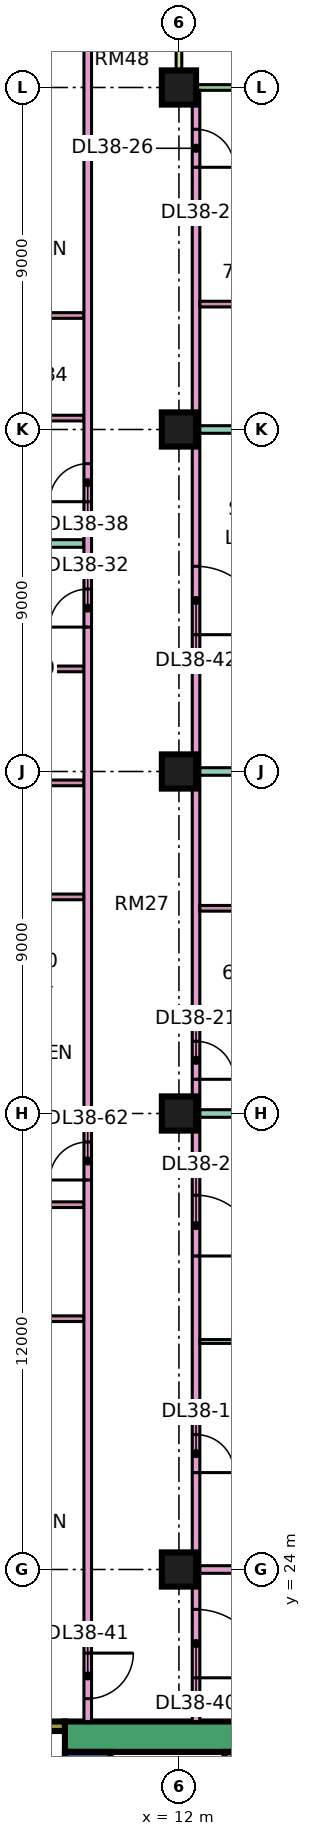
"""IFC4 building model, lengths in metres.
Left out: names, types, materials, properties, quantities, classifications, styles, units other than length and angle.
Written with IfcOpenShell. Run it as: python <this file> out.ifc"""

import sys

from ifc_helpers import new_model, si_unit, direction, frame, frame_2d, origin, origin_2d, place, context, subcontext, project, spatial, rectangle, extrude, element, fill, save


model = new_model("IFC4")
c1 = context("Model", 3, precision=1e-05, world=origin(), true_north=direction((0.0, 1.0)))
c2 = subcontext(c1, "Body", "Model", "MODEL_VIEW")
j1 = project(units=[si_unit("LENGTHUNIT", "METRE"), si_unit("PLANEANGLEUNIT", "RADIAN")], contexts=[c1])
p1 = place(None, origin())
s1 = spatial("IfcSite", under=j1, at=p1, CompositionType="ELEMENT")
p2 = place(p1, origin())
s2 = spatial("IfcBuilding", under=s1, at=p2, CompositionType="ELEMENT")
p3 = place(p2, frame((0.0, 0.0, 168.65)))
s3 = spatial("IfcBuildingStorey", under=s2, at=p3, CompositionType="ELEMENT", Elevation=168.65)
for number, where, z_axis, x_axis in (
    (1, (12.0, 24.0, 0.0), (0.0, 0.0, 1.0), (1.0, 0.0, 0.0)),
    (2, (12.0, 36.0, 0.0), (0.0, 0.0, 1.0), (1.0, 0.0, 0.0)),
    (3, (12.0, 45.0, 0.0), (0.0, 0.0, 1.0), (1.0, 0.0, 0.0)),
    (4, (12.0, 54.0, 0.0), (0.0, 0.0, 1.0), (1.0, 0.0, 0.0)),
    (5, (12.0, 63.0, 0.0), (0.0, 0.0, 1.0), (1.0, 0.0, 0.0)),
):
    element("IfcColumn", number, at=place(p3, frame(where, z_axis=z_axis, x_axis=x_axis)), inside=s3, PredefinedType="COLUMN", context=c2, shape_type="SweptSolid", body=[
        extrude(rectangle(XDim=0.9, YDim=0.9, at=origin_2d()), origin(), (0.0, 0.0, 1.0), 3.75),
    ])
p4 = place(p3, frame((9.0, 19.6, 0.0), z_axis=(0.0, 0.0, 1.0), x_axis=(1.0, 0.0, 0.0)))
e6 = element("IfcWall", 6, at=p4, inside=s3, PredefinedType="SHEAR", context=c2, shape_type="SweptSolid", body=[
    extrude(rectangle(XDim=25.0, YDim=0.8, at=frame_2d((12.5, 0.0))), origin(), (0.0, 0.0, 1.0), 3.75),
])
p5 = place(p4, frame((19.1, 0.0, 0.0)))
e7 = element("IfcOpeningElement", 7, at=p5, cuts=e6, PredefinedType="OPENING", context=c2, shape_type="SweptSolid", body=[
    extrude(rectangle(XDim=1.8, YDim=2.4, at=frame_2d((0.9, 1.2))), frame((0.0, 0.41, 0.0), z_axis=(0.0, -1.0, 0.0), x_axis=(1.0, 0.0, 0.0)), (0.0, 0.0, 1.0), 0.82),
])
p6 = place(p3, frame((9.6, 7.8, 0.0), z_axis=(0.0, 0.0, 1.0), x_axis=(0.0, 1.0, 0.0)))
e8 = element("IfcWall", 8, at=p6, inside=s3, PredefinedType="SHEAR", context=c2, shape_type="SweptSolid", body=[
    extrude(rectangle(XDim=11.4, YDim=1.2, at=frame_2d((5.7, 0.0))), origin(), (0.0, 0.0, 1.0), 3.75),
])
p7 = place(p6, frame((4.075, 0.0, 0.0)))
e9 = element("IfcOpeningElement", 9, at=p7, cuts=e8, PredefinedType="OPENING", context=c2, shape_type="SweptSolid", body=[
    extrude(rectangle(XDim=1.1, YDim=2.2, at=frame_2d((0.55, 1.1))), frame((0.0, 0.61, 0.0), z_axis=(0.0, -1.0, 0.0), x_axis=(1.0, 0.0, 0.0)), (0.0, 0.0, 1.0), 1.22),
])
p8 = place(p6, frame((6.575, 0.0, 0.0)))
e10 = element("IfcOpeningElement", 10, at=p8, cuts=e8, PredefinedType="OPENING", context=c2, shape_type="SweptSolid", body=[
    extrude(rectangle(XDim=1.1, YDim=2.2, at=frame_2d((0.55, 1.1))), frame((0.0, 0.61, 0.0), z_axis=(0.0, -1.0, 0.0), x_axis=(1.0, 0.0, 0.0)), (0.0, 0.0, 1.0), 1.22),
])
p9 = place(p6, frame((9.4, 0.0, 0.0)))
e11 = element("IfcOpeningElement", 11, at=p9, cuts=e8, PredefinedType="OPENING", context=c2, shape_type="SweptSolid", body=[
    extrude(rectangle(XDim=1.1, YDim=2.2, at=frame_2d((0.55, 1.1))), frame((0.0, 0.61, 0.0), z_axis=(0.0, -1.0, 0.0), x_axis=(1.0, 0.0, 0.0)), (0.0, 0.0, 1.0), 1.22),
])
p10 = place(p6, frame((1.75, 0.0, 0.0)))
e12 = element("IfcOpeningElement", 12, at=p10, cuts=e8, PredefinedType="OPENING", context=c2, shape_type="SweptSolid", body=[
    extrude(rectangle(XDim=0.9, YDim=2.1, at=frame_2d((0.45, 1.05))), frame((0.0, 0.61, 0.0), z_axis=(0.0, -1.0, 0.0), x_axis=(1.0, 0.0, 0.0)), (0.0, 0.0, 1.0), 1.22),
])
p11 = place(p3, frame((13.325, 7.8, 0.0), z_axis=(0.0, 0.0, 1.0), x_axis=(0.0, 1.0, 0.0)))
e13 = element("IfcWall", 13, at=p11, inside=s3, PredefinedType="SHEAR", context=c2, shape_type="SweptSolid", body=[
    extrude(rectangle(XDim=11.4, YDim=0.25, at=frame_2d((5.7, 0.0))), origin(), (0.0, 0.0, 1.0), 3.75),
])
p12 = place(p3, frame((2.1, 19.875, 0.0), z_axis=(0.0, 0.0, 1.0), x_axis=(1.0, 0.0, 0.0)))
e14 = element("IfcWall", 14, at=p12, inside=s3, PredefinedType="SHEAR", context=c2, shape_type="SweptSolid", body=[
    extrude(rectangle(XDim=6.9, YDim=0.25, at=frame_2d((3.45, 0.0))), origin(), (0.0, 0.0, 1.0), 3.75),
])
p13 = place(p12, frame((1.175, 0.0, 0.0)))
e15 = element("IfcOpeningElement", 15, at=p13, cuts=e14, PredefinedType="OPENING", context=c2, shape_type="SweptSolid", body=[
    extrude(rectangle(XDim=1.1, YDim=2.2, at=frame_2d((0.55, 1.1))), frame((0.0, 0.135, 0.0), z_axis=(0.0, -1.0, 0.0), x_axis=(1.0, 0.0, 0.0)), (0.0, 0.0, 1.0), 0.27),
])
p14 = place(p12, frame((4.6, 0.0, 0.0)))
e16 = element("IfcOpeningElement", 16, at=p14, cuts=e14, PredefinedType="OPENING", context=c2, shape_type="SweptSolid", body=[
    extrude(rectangle(XDim=1.2, YDim=2.2, at=frame_2d((0.6, 1.1))), frame((0.0, 0.135, 0.0), z_axis=(0.0, -1.0, 0.0), x_axis=(1.0, 0.0, 0.0)), (0.0, 0.0, 1.0), 0.27),
])
p15 = place(p3, frame((22.425, 63.0, 0.0), z_axis=(0.0, 0.0, 1.0), x_axis=(-1.0, 0.0, 0.0)))
e17 = element("IfcWall", 17, at=p15, inside=s3, PredefinedType="SOLIDWALL", context=c2, shape_type="SweptSolid", body=[
    extrude(rectangle(XDim=10.35, YDim=0.15, at=frame_2d((5.175, 0.0))), origin(), (0.0, 0.0, 1.0), 3.35),
])
p16 = place(p15, frame((1.087, 0.0, 0.0)))
e18 = element("IfcOpeningElement", 18, at=p16, cuts=e17, PredefinedType="OPENING", context=c2, shape_type="SweptSolid", body=[
    extrude(rectangle(XDim=1.8, YDim=2.4, at=frame_2d((0.9, 1.2))), frame((0.0, 0.085, 0.0), z_axis=(0.0, -1.0, 0.0), x_axis=(1.0, 0.0, 0.0)), (0.0, 0.0, 1.0), 0.17),
])
p17 = place(p15, frame((5.425, 0.0, 0.45)))
e19 = element("IfcOpeningElement", 19, at=p17, cuts=e17, PredefinedType="OPENING", context=c2, shape_type="SweptSolid", body=[
    extrude(rectangle(XDim=3.0, YDim=2.4, at=frame_2d((1.5, 1.2))), frame((0.0, 0.085, 0.0), z_axis=(0.0, -1.0, 0.0), x_axis=(1.0, 0.0, 0.0)), (0.0, 0.0, 1.0), 0.17),
])
p18 = place(p3, frame((12.0, 64.5, 0.0), z_axis=(0.0, 0.0, 1.0), x_axis=(0.0, -1.0, 0.0)))
e20 = element("IfcWall", 20, at=p18, inside=s3, PredefinedType="SOLIDWALL", context=c2, shape_type="SweptSolid", body=[
    extrude(rectangle(XDim=1.5, YDim=0.15, at=frame_2d((0.75, 0.0))), origin(), (0.0, 0.0, 1.0), 3.35),
])
p19 = place(p3, frame((0.0, 36.0, 0.0), z_axis=(0.0, 0.0, 1.0), x_axis=(1.0, 0.0, 0.0)))
e21 = element("IfcWall", 21, at=p19, inside=s3, PredefinedType="PARTITIONING", context=c2, shape_type="SweptSolid", body=[
    extrude(rectangle(XDim=9.5, YDim=0.2, at=frame_2d((4.75, 0.0))), origin(), (0.0, 0.0, 1.0), 3.35),
])
p20 = place(p3, frame((-1.35, 51.0, 0.0), z_axis=(0.0, 0.0, 1.0), x_axis=(1.0, 0.0, 0.0)))
e22 = element("IfcWall", 22, at=p20, inside=s3, PredefinedType="PARTITIONING", context=c2, shape_type="SweptSolid", body=[
    extrude(rectangle(XDim=10.85, YDim=0.2, at=frame_2d((5.425, 0.0))), origin(), (0.0, 0.0, 1.0), 3.35),
])
p21 = place(p3, frame((0.074, 22.4, 0.0), z_axis=(0.0, 0.0, 1.0), x_axis=(1.0, 0.0, 0.0)))
e23 = element("IfcWall", 23, at=p21, inside=s3, PredefinedType="PARTITIONING", context=c2, shape_type="SweptSolid", body=[
    extrude(rectangle(XDim=9.426, YDim=0.2, at=frame_2d((4.713, 0.0))), origin(), (0.0, 0.0, 1.0), 3.35),
])
for number, where, z_axis, x_axis in (
    (24, (6.375, 30.6, 0.0), (0.0, 0.0, 1.0), (1.0, 0.0, 0.0)),
    (25, (6.375, 33.6, 0.0), (0.0, 0.0, 1.0), (1.0, 0.0, 0.0)),
):
    element("IfcWall", number, at=place(p3, frame(where, z_axis=z_axis, x_axis=x_axis)), inside=s3, PredefinedType="PARTITIONING", context=c2, shape_type="SweptSolid", body=[
        extrude(rectangle(XDim=3.125, YDim=0.15, at=frame_2d((1.562, 0.0))), origin(), (0.0, 0.0, 1.0), 3.35),
    ])
p22 = place(p3, frame((6.375, 54.3, 0.0), z_axis=(0.0, 0.0, 1.0), x_axis=(1.0, 0.0, 0.0)))
e26 = element("IfcWall", 26, at=p22, inside=s3, PredefinedType="PARTITIONING", context=c2, shape_type="SweptSolid", body=[
    extrude(rectangle(XDim=3.125, YDim=0.15, at=frame_2d((1.562, 0.0))), origin(), (0.0, 0.0, 1.0), 3.35),
])
p23 = place(p22, frame((1.225, 0.0, 0.0)))
e27 = element("IfcOpeningElement", 27, at=p23, cuts=e26, PredefinedType="OPENING", context=c2, shape_type="SweptSolid", body=[
    extrude(rectangle(XDim=0.8, YDim=2.1, at=frame_2d((0.4, 1.05))), frame((0.0, 0.085, 0.0), z_axis=(0.0, -1.0, 0.0), x_axis=(1.0, 0.0, 0.0)), (0.0, 0.0, 1.0), 0.17),
])
p24 = place(p3, frame((6.375, 57.0, 0.0), z_axis=(0.0, 0.0, 1.0), x_axis=(1.0, 0.0, 0.0)))
e28 = element("IfcWall", 28, at=p24, inside=s3, PredefinedType="PARTITIONING", context=c2, shape_type="SweptSolid", body=[
    extrude(rectangle(XDim=3.125, YDim=0.15, at=frame_2d((1.562, 0.0))), origin(), (0.0, 0.0, 1.0), 3.35),
])
for number, where, z_axis, x_axis in (
    (29, (6.675, 41.7, 0.0), (0.0, 0.0, 1.0), (1.0, 0.0, 0.0)),
    (30, (6.675, 44.7, 0.0), (0.0, 0.0, 1.0), (1.0, 0.0, 0.0)),
    (31, (6.675, 47.7, 0.0), (0.0, 0.0, 1.0), (1.0, 0.0, 0.0)),
):
    element("IfcWall", number, at=place(p3, frame(where, z_axis=z_axis, x_axis=x_axis)), inside=s3, PredefinedType="PARTITIONING", context=c2, shape_type="SweptSolid", body=[
        extrude(rectangle(XDim=2.825, YDim=0.15, at=frame_2d((1.413, 0.0))), origin(), (0.0, 0.0, 1.0), 3.35),
    ])
p25 = place(p3, frame((9.6, 20.0, 0.0), z_axis=(0.0, 0.0, 1.0), x_axis=(0.0, 1.0, 0.0)))
e32 = element("IfcWall", 32, at=p25, inside=s3, PredefinedType="PARTITIONING", context=c2, shape_type="SweptSolid", body=[
    extrude(rectangle(XDim=44.35, YDim=0.2, at=frame_2d((22.175, 0.0))), origin(), (0.0, 0.0, 1.0), 3.35),
])
p26 = place(p25, frame((28.8, 0.0, 0.0)))
e33 = element("IfcOpeningElement", 33, at=p26, cuts=e32, PredefinedType="OPENING", context=c2, shape_type="SweptSolid", body=[
    extrude(rectangle(XDim=1.0, YDim=2.1, at=frame_2d((0.5, 1.05))), frame((0.0, 0.11, 0.0), z_axis=(0.0, -1.0, 0.0), x_axis=(1.0, 0.0, 0.0)), (0.0, 0.0, 1.0), 0.22),
])
p27 = place(p25, frame((32.1, 0.0, 0.0)))
e34 = element("IfcOpeningElement", 34, at=p27, cuts=e32, PredefinedType="OPENING", context=c2, shape_type="SweptSolid", body=[
    extrude(rectangle(XDim=1.0, YDim=2.1, at=frame_2d((0.5, 1.05))), frame((0.0, 0.11, 0.0), z_axis=(0.0, -1.0, 0.0), x_axis=(1.0, 0.0, 0.0)), (0.0, 0.0, 1.0), 0.22),
])
p28 = place(p25, frame((0.6, 0.0, 0.0)))
e35 = element("IfcOpeningElement", 35, at=p28, cuts=e32, PredefinedType="OPENING", context=c2, shape_type="SweptSolid", body=[
    extrude(rectangle(XDim=1.2, YDim=2.1, at=frame_2d((0.6, 1.05))), frame((0.0, 0.11, 0.0), z_axis=(0.0, -1.0, 0.0), x_axis=(1.0, 0.0, 0.0)), (0.0, 0.0, 1.0), 0.22),
])
p29 = place(p25, frame((14.25, 0.0, 0.0)))
e36 = element("IfcOpeningElement", 36, at=p29, cuts=e32, PredefinedType="OPENING", context=c2, shape_type="SweptSolid", body=[
    extrude(rectangle(XDim=1.0, YDim=2.1, at=frame_2d((0.5, 1.05))), frame((0.0, 0.11, 0.0), z_axis=(0.0, -1.0, 0.0), x_axis=(1.0, 0.0, 0.0)), (0.0, 0.0, 1.0), 0.22),
])
p30 = place(p3, frame((12.45, 20.0, 0.0), z_axis=(0.0, 0.0, 1.0), x_axis=(0.0, 1.0, 0.0)))
e37 = element("IfcWall", 37, at=p30, inside=s3, PredefinedType="PARTITIONING", context=c2, shape_type="SweptSolid", body=[
    extrude(rectangle(XDim=42.926, YDim=0.2, at=frame_2d((21.463, 0.0))), origin(), (0.0, 0.0, 1.0), 3.35),
])
p31 = place(p30, frame((6.55, 0.0, 0.0)))
e38 = element("IfcOpeningElement", 38, at=p31, cuts=e37, PredefinedType="OPENING", context=c2, shape_type="SweptSolid", body=[
    extrude(rectangle(XDim=1.0, YDim=2.1, at=frame_2d((0.5, 1.05))), frame((0.0, 0.11, 0.0), z_axis=(0.0, -1.0, 0.0), x_axis=(1.0, 0.0, 0.0)), (0.0, 0.0, 1.0), 0.22),
])
p32 = place(p30, frame((12.25, 0.0, 0.0)))
e39 = element("IfcOpeningElement", 39, at=p32, cuts=e37, PredefinedType="OPENING", context=c2, shape_type="SweptSolid", body=[
    extrude(rectangle(XDim=1.6, YDim=2.1, at=frame_2d((0.8, 1.05))), frame((0.0, 0.11, 0.0), z_axis=(0.0, -1.0, 0.0), x_axis=(1.0, 0.0, 0.0)), (0.0, 0.0, 1.0), 0.22),
])
p33 = place(p30, frame((16.9, 0.0, 0.0)))
e40 = element("IfcOpeningElement", 40, at=p33, cuts=e37, PredefinedType="OPENING", context=c2, shape_type="SweptSolid", body=[
    extrude(rectangle(XDim=1.0, YDim=2.1, at=frame_2d((0.5, 1.05))), frame((0.0, 0.11, 0.0), z_axis=(0.0, -1.0, 0.0), x_axis=(1.0, 0.0, 0.0)), (0.0, 0.0, 1.0), 0.22),
])
p34 = place(p30, frame((40.9, 0.0, 0.0)))
e41 = element("IfcOpeningElement", 41, at=p34, cuts=e37, PredefinedType="OPENING", context=c2, shape_type="SweptSolid", body=[
    extrude(rectangle(XDim=1.0, YDim=2.1, at=frame_2d((0.5, 1.05))), frame((0.0, 0.11, 0.0), z_axis=(0.0, -1.0, 0.0), x_axis=(1.0, 0.0, 0.0)), (0.0, 0.0, 1.0), 0.22),
])
p35 = place(p30, frame((1.15, 0.0, 0.0)))
e42 = element("IfcOpeningElement", 42, at=p35, cuts=e37, PredefinedType="OPENING", context=c2, shape_type="SweptSolid", body=[
    extrude(rectangle(XDim=1.8, YDim=2.1, at=frame_2d((0.9, 1.05))), frame((0.0, 0.11, 0.0), z_axis=(0.0, -1.0, 0.0), x_axis=(1.0, 0.0, 0.0)), (0.0, 0.0, 1.0), 0.22),
])
p36 = place(p30, frame((28.6, 0.0, 0.0)))
e43 = element("IfcOpeningElement", 43, at=p36, cuts=e37, PredefinedType="OPENING", context=c2, shape_type="SweptSolid", body=[
    extrude(rectangle(XDim=1.8, YDim=2.1, at=frame_2d((0.9, 1.05))), frame((0.0, 0.11, 0.0), z_axis=(0.0, -1.0, 0.0), x_axis=(1.0, 0.0, 0.0)), (0.0, 0.0, 1.0), 0.22),
])
p37 = place(p3, frame((12.55, 24.0, 0.0), z_axis=(0.0, 0.0, 1.0), x_axis=(1.0, 0.0, 0.0)))
e44 = element("IfcWall", 44, at=p37, inside=s3, PredefinedType="PARTITIONING", context=c2, shape_type="SweptSolid", body=[
    extrude(rectangle(XDim=8.95, YDim=0.2, at=frame_2d((4.475, 0.0))), origin(), (0.0, 0.0, 1.0), 3.35),
])
p38 = place(p3, frame((12.55, 30.0, 0.0), z_axis=(0.0, 0.0, 1.0), x_axis=(1.0, 0.0, 0.0)))
e45 = element("IfcWall", 45, at=p38, inside=s3, PredefinedType="PARTITIONING", context=c2, shape_type="SweptSolid", body=[
    extrude(rectangle(XDim=8.95, YDim=0.1, at=frame_2d((4.475, 0.0))), origin(), (0.0, 0.0, 1.0), 3.35),
])
p39 = place(p3, frame((12.55, 36.0, 0.0), z_axis=(0.0, 0.0, 1.0), x_axis=(1.0, 0.0, 0.0)))
e46 = element("IfcWall", 46, at=p39, inside=s3, PredefinedType="PARTITIONING", context=c2, shape_type="SweptSolid", body=[
    extrude(rectangle(XDim=11.45, YDim=0.2, at=frame_2d((5.725, 0.0))), origin(), (0.0, 0.0, 1.0), 3.35),
])
for number, where, z_axis, x_axis in (
    (47, (12.55, 38.7, 0.0), (0.0, 0.0, 1.0), (1.0, 0.0, 0.0)),
    (48, (12.55, 41.4, 0.0), (0.0, 0.0, 1.0), (1.0, 0.0, 0.0)),
):
    element("IfcWall", number, at=place(p3, frame(where, z_axis=z_axis, x_axis=x_axis)), inside=s3, PredefinedType="PARTITIONING", context=c2, shape_type="SweptSolid", body=[
        extrude(rectangle(XDim=4.625, YDim=0.15, at=frame_2d((2.312, 0.0))), origin(), (0.0, 0.0, 1.0), 3.35),
    ])
p40 = place(p3, frame((12.55, 45.0, 0.0), z_axis=(0.0, 0.0, 1.0), x_axis=(1.0, 0.0, 0.0)))
e49 = element("IfcWall", 49, at=p40, inside=s3, PredefinedType="PARTITIONING", context=c2, shape_type="SweptSolid", body=[
    extrude(rectangle(XDim=11.376, YDim=0.2, at=frame_2d((5.688, 0.0))), origin(), (0.0, 0.0, 1.0), 3.35),
])
p41 = place(p3, frame((12.55, 54.0, 0.0), z_axis=(0.0, 0.0, 1.0), x_axis=(1.0, 0.0, 0.0)))
e50 = element("IfcWall", 50, at=p41, inside=s3, PredefinedType="PARTITIONING", context=c2, shape_type="SweptSolid", body=[
    extrude(rectangle(XDim=11.45, YDim=0.2, at=frame_2d((5.725, 0.0))), origin(), (0.0, 0.0, 1.0), 3.35),
])
p42 = place(p3, frame((12.55, 57.3, 0.0), z_axis=(0.0, 0.0, 1.0), x_axis=(1.0, 0.0, 0.0)))
e51 = element("IfcWall", 51, at=p42, inside=s3, PredefinedType="PARTITIONING", context=c2, shape_type="SweptSolid", body=[
    extrude(rectangle(XDim=4.625, YDim=0.15, at=frame_2d((2.312, 0.0))), origin(), (0.0, 0.0, 1.0), 3.35),
])
p43 = place(p3, frame((12.55, 59.7, 0.0), z_axis=(0.0, 0.0, 1.0), x_axis=(1.0, 0.0, 0.0)))
e52 = element("IfcWall", 52, at=p43, inside=s3, PredefinedType="PARTITIONING", context=c2, shape_type="SweptSolid", body=[
    extrude(rectangle(XDim=4.625, YDim=0.15, at=frame_2d((2.312, 0.0))), origin(), (0.0, 0.0, 1.0), 3.35),
])
p44 = place(p43, frame((1.85, 0.0, 0.0)))
e53 = element("IfcOpeningElement", 53, at=p44, cuts=e52, PredefinedType="OPENING", context=c2, shape_type="SweptSolid", body=[
    extrude(rectangle(XDim=0.8, YDim=2.1, at=frame_2d((0.4, 1.05))), frame((0.0, 0.085, 0.0), z_axis=(0.0, -1.0, 0.0), x_axis=(1.0, 0.0, 0.0)), (0.0, 0.0, 1.0), 0.17),
])
p45 = place(p31, frame((1.0, 0.0, 0.0), z_axis=(0.0, 0.0, 1.0), x_axis=(-1.0, 0.0, 0.0)))
e54 = element("IfcDoor", 54, at=p45, inside=s3, OperationType="SINGLE_SWING_LEFT", PredefinedType="DOOR", context=c2, shape_type="SweptSolid", body=[
    extrude(rectangle(XDim=1.0, YDim=2.1, at=frame_2d((0.5, 1.05))), frame((0.0, 0.025, 0.0), z_axis=(0.0, -1.0, 0.0), x_axis=(1.0, 0.0, 0.0)), (0.0, 0.0, 1.0), 0.05),
])
fill(e38, e54)
p46 = place(p32, frame((1.6, 0.0, 0.0), z_axis=(0.0, 0.0, 1.0), x_axis=(-1.0, 0.0, 0.0)))
e55 = element("IfcDoor", 55, at=p46, inside=s3, OperationType="DOUBLE_DOOR_SINGLE_SWING", PredefinedType="DOOR", context=c2, shape_type="SweptSolid", body=[
    extrude(rectangle(XDim=1.6, YDim=2.1, at=frame_2d((0.8, 1.05))), frame((0.0, 0.025, 0.0), z_axis=(0.0, -1.0, 0.0), x_axis=(1.0, 0.0, 0.0)), (0.0, 0.0, 1.0), 0.05),
])
fill(e39, e55)
p47 = place(p33, frame((1.0, 0.0, 0.0), z_axis=(0.0, 0.0, 1.0), x_axis=(-1.0, 0.0, 0.0)))
e56 = element("IfcDoor", 56, at=p47, inside=s3, OperationType="SINGLE_SWING_LEFT", PredefinedType="DOOR", context=c2, shape_type="SweptSolid", body=[
    extrude(rectangle(XDim=1.0, YDim=2.1, at=frame_2d((0.5, 1.05))), frame((0.0, 0.025, 0.0), z_axis=(0.0, -1.0, 0.0), x_axis=(1.0, 0.0, 0.0)), (0.0, 0.0, 1.0), 0.05),
])
fill(e40, e56)
p48 = place(p34, frame((1.0, 0.0, 0.0), z_axis=(0.0, 0.0, 1.0), x_axis=(-1.0, 0.0, 0.0)))
e57 = element("IfcDoor", 57, at=p48, inside=s3, OperationType="SINGLE_SWING_LEFT", PredefinedType="DOOR", context=c2, shape_type="SweptSolid", body=[
    extrude(rectangle(XDim=1.0, YDim=2.1, at=frame_2d((0.5, 1.05))), frame((0.0, 0.025, 0.0), z_axis=(0.0, -1.0, 0.0), x_axis=(1.0, 0.0, 0.0)), (0.0, 0.0, 1.0), 0.05),
])
fill(e41, e57)
p49 = place(p26, origin())
e58 = element("IfcDoor", 58, at=p49, inside=s3, OperationType="SINGLE_SWING_LEFT", PredefinedType="DOOR", context=c2, shape_type="SweptSolid", body=[
    extrude(rectangle(XDim=1.0, YDim=2.1, at=frame_2d((0.5, 1.05))), frame((0.0, 0.025, 0.0), z_axis=(0.0, -1.0, 0.0), x_axis=(1.0, 0.0, 0.0)), (0.0, 0.0, 1.0), 0.05),
])
fill(e33, e58)
p50 = place(p27, origin())
e59 = element("IfcDoor", 59, at=p50, inside=s3, OperationType="SINGLE_SWING_LEFT", PredefinedType="DOOR", context=c2, shape_type="SweptSolid", body=[
    extrude(rectangle(XDim=1.0, YDim=2.1, at=frame_2d((0.5, 1.05))), frame((0.0, 0.025, 0.0), z_axis=(0.0, -1.0, 0.0), x_axis=(1.0, 0.0, 0.0)), (0.0, 0.0, 1.0), 0.05),
])
fill(e34, e59)
p51 = place(p35, frame((1.8, 0.0, 0.0), z_axis=(0.0, 0.0, 1.0), x_axis=(-1.0, 0.0, 0.0)))
e60 = element("IfcDoor", 60, at=p51, inside=s3, OperationType="DOUBLE_DOOR_SINGLE_SWING", PredefinedType="DOOR", context=c2, shape_type="SweptSolid", body=[
    extrude(rectangle(XDim=1.8, YDim=2.1, at=frame_2d((0.9, 1.05))), frame((0.0, 0.025, 0.0), z_axis=(0.0, -1.0, 0.0), x_axis=(1.0, 0.0, 0.0)), (0.0, 0.0, 1.0), 0.05),
])
fill(e42, e60)
p52 = place(p28, origin())
e61 = element("IfcDoor", 61, at=p52, inside=s3, OperationType="SINGLE_SWING_RIGHT", PredefinedType="DOOR", context=c2, shape_type="SweptSolid", body=[
    extrude(rectangle(XDim=1.2, YDim=2.1, at=frame_2d((0.6, 1.05))), frame((0.0, 0.025, 0.0), z_axis=(0.0, -1.0, 0.0), x_axis=(1.0, 0.0, 0.0)), (0.0, 0.0, 1.0), 0.05),
])
fill(e35, e61)
p53 = place(p36, frame((1.8, 0.0, 0.0), z_axis=(0.0, 0.0, 1.0), x_axis=(-1.0, 0.0, 0.0)))
e62 = element("IfcDoor", 62, at=p53, inside=s3, OperationType="DOUBLE_DOOR_SINGLE_SWING", PredefinedType="DOOR", context=c2, shape_type="SweptSolid", body=[
    extrude(rectangle(XDim=1.8, YDim=2.1, at=frame_2d((0.9, 1.05))), frame((0.0, 0.025, 0.0), z_axis=(0.0, -1.0, 0.0), x_axis=(1.0, 0.0, 0.0)), (0.0, 0.0, 1.0), 0.05),
])
fill(e43, e62)
p54 = place(p29, origin())
e63 = element("IfcDoor", 63, at=p54, inside=s3, OperationType="SINGLE_SWING_LEFT", PredefinedType="DOOR", context=c2, shape_type="SweptSolid", body=[
    extrude(rectangle(XDim=1.0, YDim=2.1, at=frame_2d((0.5, 1.05))), frame((0.0, 0.025, 0.0), z_axis=(0.0, -1.0, 0.0), x_axis=(1.0, 0.0, 0.0)), (0.0, 0.0, 1.0), 0.05),
])
fill(e36, e63)
save(model, sys.argv[1])
